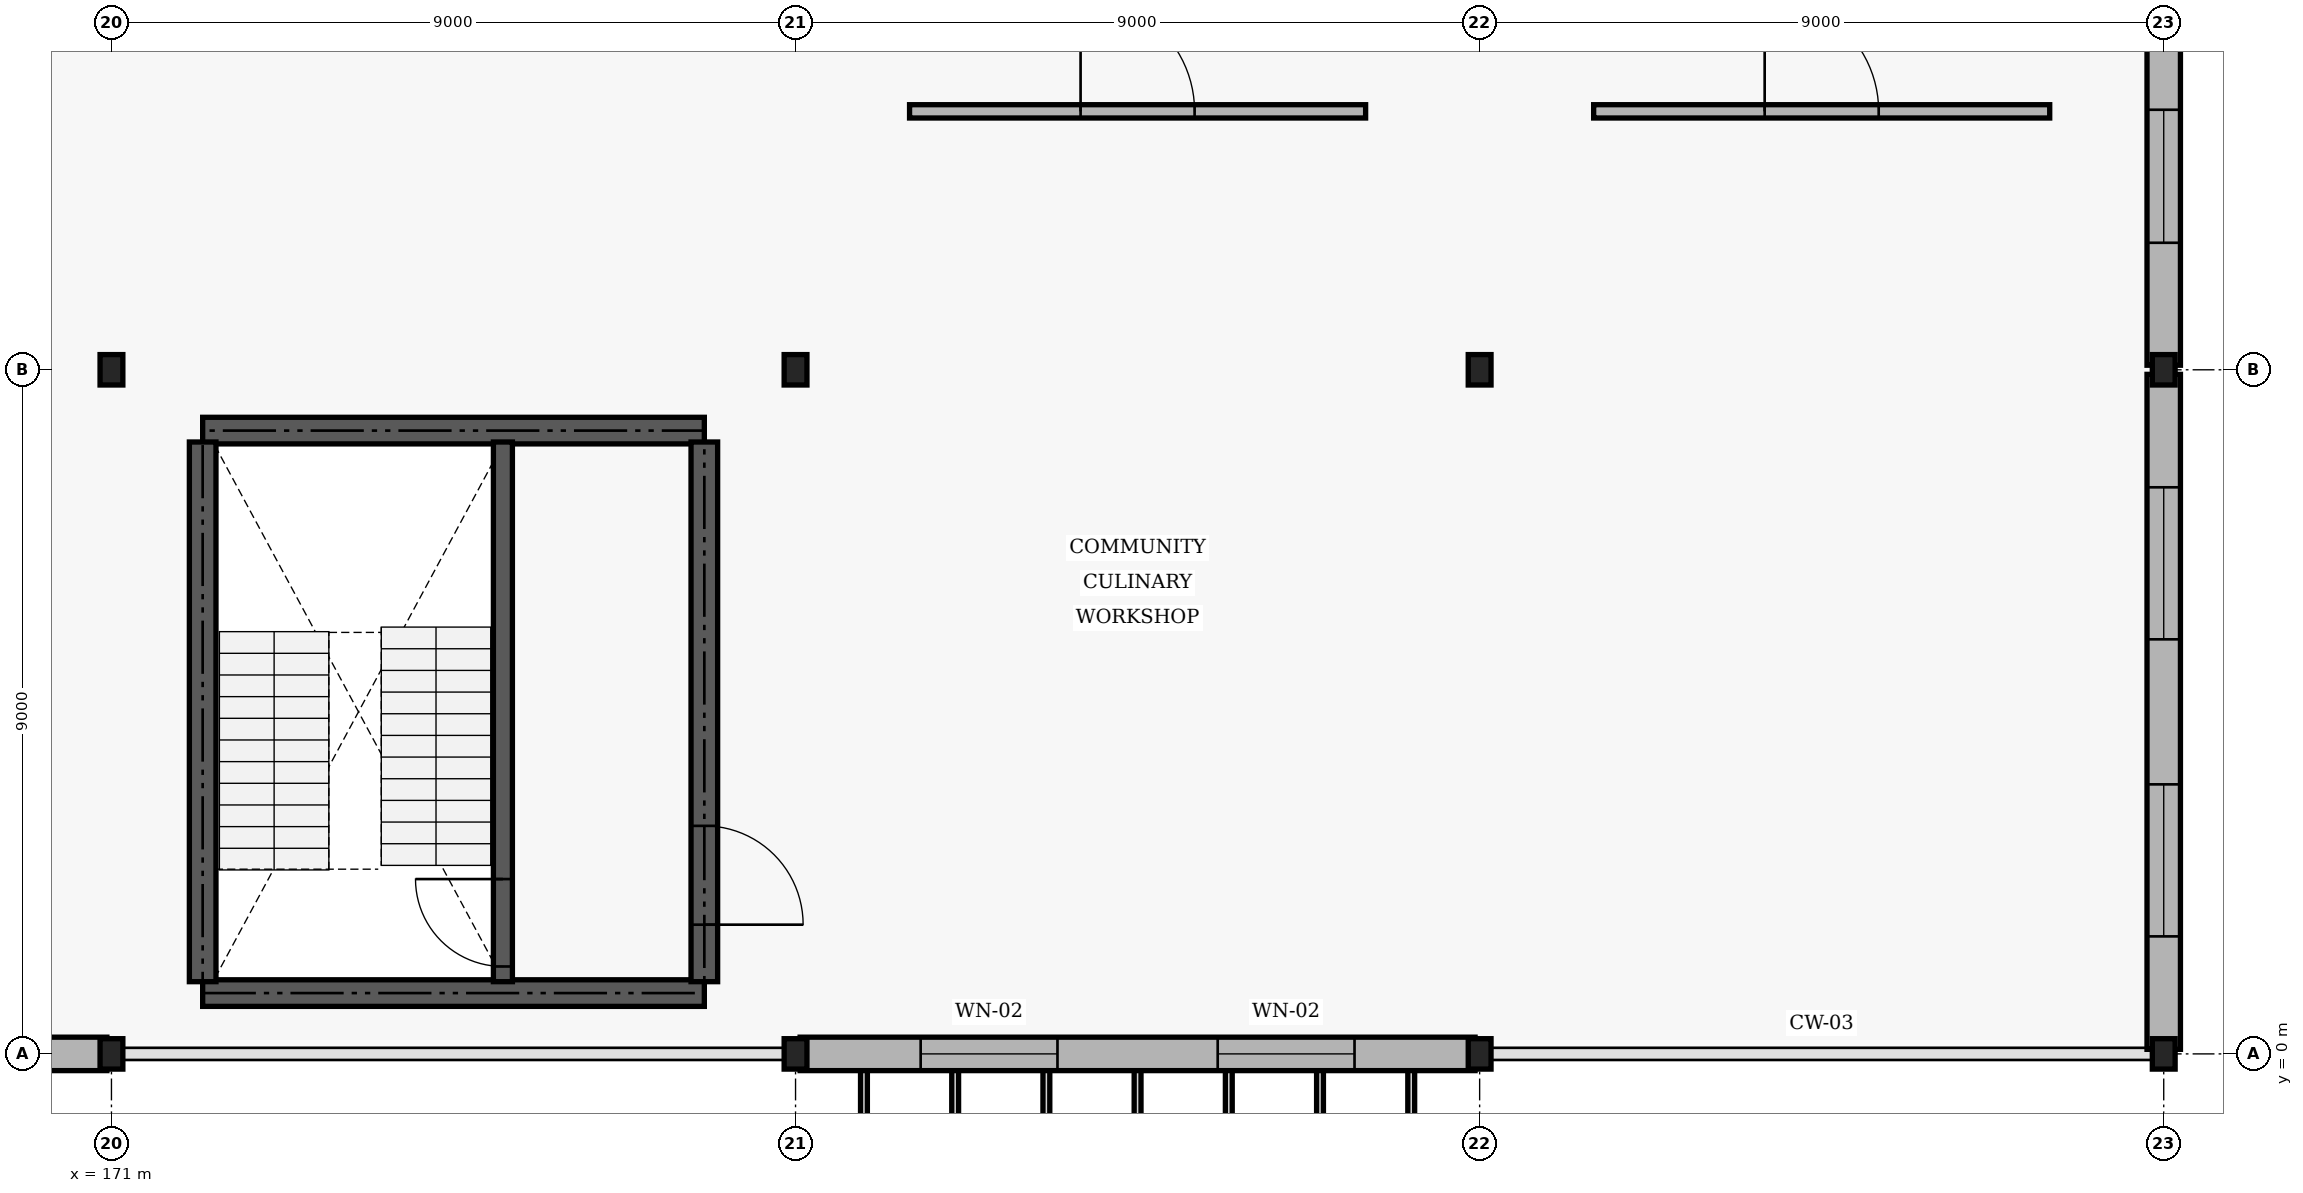
"""IFC4 building model, lengths in metres.
Left out: names, types, materials, properties, quantities, classifications, styles, units other than length and angle.
Written with IfcOpenShell. Run it as: python <this file> out.ifc"""

import sys

from ifc_helpers import new_model, si_unit, direction, frame, frame_2d, origin, origin_2d, place, context, subcontext, project, spatial, rectangle, i_section, extrude, element, fill, save


model = new_model("IFC4")
c1 = context("Model", 3, precision=1e-05, world=origin(), true_north=direction((0.0, 1.0)))
c2 = subcontext(c1, "Body", "Model", "MODEL_VIEW")
j1 = project(units=[si_unit("LENGTHUNIT", "METRE"), si_unit("PLANEANGLEUNIT", "RADIAN")], contexts=[c1])
p1 = place(None, origin())
s1 = spatial("IfcSite", under=j1, at=p1, CompositionType="ELEMENT")
p2 = place(p1, origin())
s2 = spatial("IfcBuilding", under=s1, at=p2, CompositionType="ELEMENT")
p3 = place(p2, frame((0.0, 0.0, 5.4)))
s3 = spatial("IfcBuildingStorey", under=s2, at=p3, CompositionType="ELEMENT", Elevation=5.4)
for number, where, z_axis, x_axis in (
    (1, (171.0, 0.0, 0.0), (0.0, 0.0, 1.0), (1.0, 0.0, 0.0)),
    (2, (171.0, 9.0, 0.0), (0.0, 0.0, 1.0), (1.0, 0.0, 0.0)),
    (3, (180.0, 0.0, 0.0), (0.0, 0.0, 1.0), (1.0, 0.0, 0.0)),
    (4, (180.0, 9.0, 0.0), (0.0, 0.0, 1.0), (1.0, 0.0, 0.0)),
    (5, (189.0, 0.0, 0.0), (0.0, 0.0, 1.0), (1.0, 0.0, 0.0)),
    (6, (189.0, 9.0, 0.0), (0.0, 0.0, 1.0), (1.0, 0.0, 0.0)),
    (7, (198.0, 0.0, 0.0), (0.0, 0.0, 1.0), (1.0, 0.0, 0.0)),
    (8, (198.0, 9.0, 0.0), (0.0, 0.0, 1.0), (1.0, 0.0, 0.0)),
):
    element("IfcColumn", number, at=place(p3, frame(where, z_axis=z_axis, x_axis=x_axis)), inside=s3, PredefinedType="COLUMN", context=c2, shape_type="SweptSolid", body=[
        extrude(i_section(OverallWidth=0.3, OverallDepth=0.4, WebThickness=0.013, FlangeThickness=0.024, FilletRadius=0.027, at=origin_2d()), origin(), (0.0, 0.0, 1.0), 4.2),
    ])
p4 = place(p3, frame((162.06, 0.0, 0.0), z_axis=(0.0, 0.0, 1.0), x_axis=(1.0, 0.0, 0.0)))
e9 = element("IfcWall", 9, at=p4, inside=s3, PredefinedType="SOLIDWALL", context=c2, shape_type="SweptSolid", body=[
    extrude(rectangle(XDim=8.88, YDim=0.44, at=frame_2d((4.44, 0.0))), origin(), (0.0, 0.0, 1.0), 3.5),
])
p5 = place(p4, frame((1.586, 0.0, 0.9)))
e10 = element("IfcOpeningElement", 10, at=p5, cuts=e9, PredefinedType="OPENING", context=c2, shape_type="SweptSolid", body=[
    extrude(rectangle(XDim=1.8, YDim=2.1, at=frame_2d((0.9, 1.05))), frame((0.0, 0.23, 0.0), z_axis=(0.0, -1.0, 0.0), x_axis=(1.0, 0.0, 0.0)), (0.0, 0.0, 1.0), 0.46),
])
p6 = place(p4, frame((5.494, 0.0, 0.9)))
e11 = element("IfcOpeningElement", 11, at=p6, cuts=e9, PredefinedType="OPENING", context=c2, shape_type="SweptSolid", body=[
    extrude(rectangle(XDim=1.8, YDim=2.1, at=frame_2d((0.9, 1.05))), frame((0.0, 0.23, 0.0), z_axis=(0.0, -1.0, 0.0), x_axis=(1.0, 0.0, 0.0)), (0.0, 0.0, 1.0), 0.46),
])
p7 = place(p3, frame((180.06, 0.0, 0.0), z_axis=(0.0, 0.0, 1.0), x_axis=(1.0, 0.0, 0.0)))
e12 = element("IfcWall", 12, at=p7, inside=s3, PredefinedType="SOLIDWALL", context=c2, shape_type="SweptSolid", body=[
    extrude(rectangle(XDim=8.88, YDim=0.44, at=frame_2d((4.44, 0.0))), origin(), (0.0, 0.0, 1.0), 3.5),
])
p8 = place(p7, frame((1.586, 0.0, 0.9)))
e13 = element("IfcOpeningElement", 13, at=p8, cuts=e12, PredefinedType="OPENING", context=c2, shape_type="SweptSolid", body=[
    extrude(rectangle(XDim=1.8, YDim=2.1, at=frame_2d((0.9, 1.05))), frame((0.0, 0.23, 0.0), z_axis=(0.0, -1.0, 0.0), x_axis=(1.0, 0.0, 0.0)), (0.0, 0.0, 1.0), 0.46),
])
p9 = place(p7, frame((5.494, 0.0, 0.9)))
e14 = element("IfcOpeningElement", 14, at=p9, cuts=e12, PredefinedType="OPENING", context=c2, shape_type="SweptSolid", body=[
    extrude(rectangle(XDim=1.8, YDim=2.1, at=frame_2d((0.9, 1.05))), frame((0.0, 0.23, 0.0), z_axis=(0.0, -1.0, 0.0), x_axis=(1.0, 0.0, 0.0)), (0.0, 0.0, 1.0), 0.46),
])
p10 = place(p3, frame((198.0, 0.06, 0.0), z_axis=(0.0, 0.0, 1.0), x_axis=(0.0, 1.0, 0.0)))
e15 = element("IfcWall", 15, at=p10, inside=s3, PredefinedType="SOLIDWALL", context=c2, shape_type="SweptSolid", body=[
    extrude(rectangle(XDim=8.88, YDim=0.44, at=frame_2d((4.44, 0.0))), origin(), (0.0, 0.0, 1.0), 3.5),
])
p11 = place(p10, frame((1.486, 0.0, 0.9)))
e16 = element("IfcOpeningElement", 16, at=p11, cuts=e15, PredefinedType="OPENING", context=c2, shape_type="SweptSolid", body=[
    extrude(rectangle(XDim=2.0, YDim=2.4, at=frame_2d((1.0, 1.2))), frame((0.0, 0.23, 0.0), z_axis=(0.0, -1.0, 0.0), x_axis=(1.0, 0.0, 0.0)), (0.0, 0.0, 1.0), 0.46),
])
p12 = place(p10, frame((5.394, 0.0, 0.9)))
e17 = element("IfcOpeningElement", 17, at=p12, cuts=e15, PredefinedType="OPENING", context=c2, shape_type="SweptSolid", body=[
    extrude(rectangle(XDim=2.0, YDim=2.4, at=frame_2d((1.0, 1.2))), frame((0.0, 0.23, 0.0), z_axis=(0.0, -1.0, 0.0), x_axis=(1.0, 0.0, 0.0)), (0.0, 0.0, 1.0), 0.46),
])
p13 = place(p3, frame((198.0, 9.06, 0.0), z_axis=(0.0, 0.0, 1.0), x_axis=(0.0, 1.0, 0.0)))
e18 = element("IfcWall", 18, at=p13, inside=s3, PredefinedType="SOLIDWALL", context=c2, shape_type="SweptSolid", body=[
    extrude(rectangle(XDim=8.88, YDim=0.44, at=frame_2d((4.44, 0.0))), origin(), (0.0, 0.0, 1.0), 3.5),
])
p14 = place(p13, frame((1.611, 0.0, 0.9)))
e19 = element("IfcOpeningElement", 19, at=p14, cuts=e18, PredefinedType="OPENING", context=c2, shape_type="SweptSolid", body=[
    extrude(rectangle(XDim=1.75, YDim=2.25, at=frame_2d((0.875, 1.125))), frame((0.0, 0.23, 0.0), z_axis=(0.0, -1.0, 0.0), x_axis=(1.0, 0.0, 0.0)), (0.0, 0.0, 1.0), 0.46),
])
p15 = place(p13, frame((5.519, 0.0, 0.9)))
e20 = element("IfcOpeningElement", 20, at=p15, cuts=e18, PredefinedType="OPENING", context=c2, shape_type="SweptSolid", body=[
    extrude(rectangle(XDim=1.75, YDim=2.25, at=frame_2d((0.875, 1.125))), frame((0.0, 0.23, 0.0), z_axis=(0.0, -1.0, 0.0), x_axis=(1.0, 0.0, 0.0)), (0.0, 0.0, 1.0), 0.46),
])
for number, where, z_axis, x_axis in (
    (21, (172.2, 0.8, 0.0), (0.0, 0.0, 1.0), (1.0, 0.0, 0.0)),
    (22, (172.2, 8.2, 0.0), (0.0, 0.0, 1.0), (1.0, 0.0, 0.0)),
):
    element("IfcWall", number, at=place(p3, frame(where, z_axis=z_axis, x_axis=x_axis)), inside=s3, PredefinedType="SHEAR", context=c2, shape_type="SweptSolid", body=[
        extrude(rectangle(XDim=6.6, YDim=0.35, at=frame_2d((3.3, 0.0))), origin(), (0.0, 0.0, 1.0), 4.2),
    ])
p16 = place(p3, frame((172.2, 0.95, 0.0), z_axis=(0.0, 0.0, 1.0), x_axis=(0.0, 1.0, 0.0)))
e23 = element("IfcWall", 23, at=p16, inside=s3, PredefinedType="SHEAR", context=c2, shape_type="SweptSolid", body=[
    extrude(rectangle(XDim=7.1, YDim=0.35, at=frame_2d((3.55, 0.0))), origin(), (0.0, 0.0, 1.0), 4.2),
])
p17 = place(p3, frame((178.8, 0.95, 0.0), z_axis=(0.0, 0.0, 1.0), x_axis=(0.0, 1.0, 0.0)))
e24 = element("IfcWall", 24, at=p17, inside=s3, PredefinedType="SHEAR", context=c2, shape_type="SweptSolid", body=[
    extrude(rectangle(XDim=7.1, YDim=0.35, at=frame_2d((3.55, 0.0))), origin(), (0.0, 0.0, 1.0), 4.2),
])
p18 = place(p17, frame((0.75, 0.0, 0.0)))
e25 = element("IfcOpeningElement", 25, at=p18, cuts=e24, PredefinedType="OPENING", context=c2, shape_type="SweptSolid", body=[
    extrude(rectangle(XDim=1.3, YDim=2.15, at=frame_2d((0.65, 1.075))), frame((0.0, 0.185, 0.0), z_axis=(0.0, -1.0, 0.0), x_axis=(1.0, 0.0, 0.0)), (0.0, 0.0, 1.0), 0.37),
])
p19 = place(p3, frame((176.15, 0.95, 0.0), z_axis=(0.0, 0.0, 1.0), x_axis=(0.0, 1.0, 0.0)))
e26 = element("IfcWall", 26, at=p19, inside=s3, PredefinedType="SHEAR", context=c2, shape_type="SweptSolid", body=[
    extrude(rectangle(XDim=7.1, YDim=0.25, at=frame_2d((3.55, 0.0))), origin(), (0.0, 0.0, 1.0), 4.2),
])
p20 = place(p19, frame((0.2, 0.0, 0.0)))
e27 = element("IfcOpeningElement", 27, at=p20, cuts=e26, PredefinedType="OPENING", context=c2, shape_type="SweptSolid", body=[
    extrude(rectangle(XDim=1.15, YDim=2.15, at=frame_2d((0.575, 1.075))), frame((0.0, 0.135, 0.0), z_axis=(0.0, -1.0, 0.0), x_axis=(1.0, 0.0, 0.0)), (0.0, 0.0, 1.0), 0.27),
])
p21 = place(p3, frame((181.5, 12.4, 0.0), z_axis=(0.0, 0.0, 1.0), x_axis=(1.0, 0.0, 0.0)))
e28 = element("IfcWall", 28, at=p21, inside=s3, PredefinedType="PARTITIONING", context=c2, shape_type="SweptSolid", body=[
    extrude(rectangle(XDim=6.0, YDim=0.175, at=frame_2d((3.0, 0.0))), origin(), (0.0, 0.0, 1.0), 3.2),
])
p22 = place(p21, frame((2.25, 0.0, 0.0)))
e29 = element("IfcOpeningElement", 29, at=p22, cuts=e28, PredefinedType="OPENING", context=c2, shape_type="SweptSolid", body=[
    extrude(rectangle(XDim=1.5, YDim=2.2, at=frame_2d((0.75, 1.1))), frame((0.0, 0.097, 0.0), z_axis=(0.0, -1.0, 0.0), x_axis=(1.0, 0.0, 0.0)), (0.0, 0.0, 1.0), 0.195),
])
p23 = place(p3, frame((190.5, 12.4, 0.0), z_axis=(0.0, 0.0, 1.0), x_axis=(1.0, 0.0, 0.0)))
e30 = element("IfcWall", 30, at=p23, inside=s3, PredefinedType="PARTITIONING", context=c2, shape_type="SweptSolid", body=[
    extrude(rectangle(XDim=6.0, YDim=0.175, at=frame_2d((3.0, 0.0))), origin(), (0.0, 0.0, 1.0), 3.2),
])
p24 = place(p23, frame((2.25, 0.0, 0.0)))
e31 = element("IfcOpeningElement", 31, at=p24, cuts=e30, PredefinedType="OPENING", context=c2, shape_type="SweptSolid", body=[
    extrude(rectangle(XDim=1.5, YDim=2.2, at=frame_2d((0.75, 1.1))), frame((0.0, 0.097, 0.0), z_axis=(0.0, -1.0, 0.0), x_axis=(1.0, 0.0, 0.0)), (0.0, 0.0, 1.0), 0.195),
])
p25 = place(p8, origin())
e32 = element("IfcWindow", 32, at=p25, inside=s3, PartitioningType="SINGLE_PANEL", PredefinedType="WINDOW", context=c2, shape_type="SweptSolid", body=[
    extrude(rectangle(XDim=1.8, YDim=2.1, at=frame_2d((0.9, 1.05))), frame((0.0, 0.03, 0.0), z_axis=(0.0, -1.0, 0.0), x_axis=(1.0, 0.0, 0.0)), (0.0, 0.0, 1.0), 0.06),
])
fill(e13, e32)
p26 = place(p9, origin())
e33 = element("IfcWindow", 33, at=p26, inside=s3, PartitioningType="SINGLE_PANEL", PredefinedType="WINDOW", context=c2, shape_type="SweptSolid", body=[
    extrude(rectangle(XDim=1.8, YDim=2.1, at=frame_2d((0.9, 1.05))), frame((0.0, 0.03, 0.0), z_axis=(0.0, -1.0, 0.0), x_axis=(1.0, 0.0, 0.0)), (0.0, 0.0, 1.0), 0.06),
])
fill(e14, e33)
p27 = place(p11, origin())
e34 = element("IfcWindow", 34, at=p27, inside=s3, PartitioningType="SINGLE_PANEL", PredefinedType="WINDOW", context=c2, shape_type="SweptSolid", body=[
    extrude(rectangle(XDim=2.0, YDim=2.4, at=frame_2d((1.0, 1.2))), frame((0.0, 0.03, 0.0), z_axis=(0.0, -1.0, 0.0), x_axis=(1.0, 0.0, 0.0)), (0.0, 0.0, 1.0), 0.06),
])
fill(e16, e34)
p28 = place(p12, origin())
e35 = element("IfcWindow", 35, at=p28, inside=s3, PartitioningType="SINGLE_PANEL", PredefinedType="WINDOW", context=c2, shape_type="SweptSolid", body=[
    extrude(rectangle(XDim=2.0, YDim=2.4, at=frame_2d((1.0, 1.2))), frame((0.0, 0.03, 0.0), z_axis=(0.0, -1.0, 0.0), x_axis=(1.0, 0.0, 0.0)), (0.0, 0.0, 1.0), 0.06),
])
fill(e17, e35)
p29 = place(p14, origin())
e36 = element("IfcWindow", 36, at=p29, inside=s3, PartitioningType="SINGLE_PANEL", PredefinedType="WINDOW", context=c2, shape_type="SweptSolid", body=[
    extrude(rectangle(XDim=1.75, YDim=2.25, at=frame_2d((0.875, 1.125))), frame((0.0, 0.03, 0.0), z_axis=(0.0, -1.0, 0.0), x_axis=(1.0, 0.0, 0.0)), (0.0, 0.0, 1.0), 0.06),
])
fill(e19, e36)
p30 = place(p18, frame((1.3, 0.0, 0.0), z_axis=(0.0, 0.0, 1.0), x_axis=(-1.0, 0.0, 0.0)))
e37 = element("IfcDoor", 37, at=p30, inside=s3, OperationType="DOUBLE_DOOR_SINGLE_SWING", PredefinedType="DOOR", context=c2, shape_type="SweptSolid", body=[
    extrude(rectangle(XDim=1.3, YDim=2.15, at=frame_2d((0.65, 1.075))), frame((0.0, 0.025, 0.0), z_axis=(0.0, -1.0, 0.0), x_axis=(1.0, 0.0, 0.0)), (0.0, 0.0, 1.0), 0.05),
])
fill(e25, e37)
p31 = place(p20, frame((1.15, 0.0, 0.0), z_axis=(0.0, 0.0, 1.0), x_axis=(-1.0, 0.0, 0.0)))
e38 = element("IfcDoor", 38, at=p31, inside=s3, OperationType="SINGLE_SWING_RIGHT", PredefinedType="DOOR", context=c2, shape_type="SweptSolid", body=[
    extrude(rectangle(XDim=1.15, YDim=2.15, at=frame_2d((0.575, 1.075))), frame((0.0, 0.025, 0.0), z_axis=(0.0, -1.0, 0.0), x_axis=(1.0, 0.0, 0.0)), (0.0, 0.0, 1.0), 0.05),
])
fill(e27, e38)
p32 = place(p22, origin())
e39 = element("IfcDoor", 39, at=p32, inside=s3, OperationType="DOUBLE_DOOR_SINGLE_SWING", PredefinedType="DOOR", context=c2, shape_type="SweptSolid", body=[
    extrude(rectangle(XDim=1.5, YDim=2.2, at=frame_2d((0.75, 1.1))), frame((0.0, 0.025, 0.0), z_axis=(0.0, -1.0, 0.0), x_axis=(1.0, 0.0, 0.0)), (0.0, 0.0, 1.0), 0.05),
])
fill(e29, e39)
p33 = place(p24, origin())
e40 = element("IfcDoor", 40, at=p33, inside=s3, OperationType="DOUBLE_DOOR_SINGLE_SWING", PredefinedType="DOOR", context=c2, shape_type="SweptSolid", body=[
    extrude(rectangle(XDim=1.5, YDim=2.2, at=frame_2d((0.75, 1.1))), frame((0.0, 0.025, 0.0), z_axis=(0.0, -1.0, 0.0), x_axis=(1.0, 0.0, 0.0)), (0.0, 0.0, 1.0), 0.05),
])
fill(e31, e40)
save(model, sys.argv[1])
